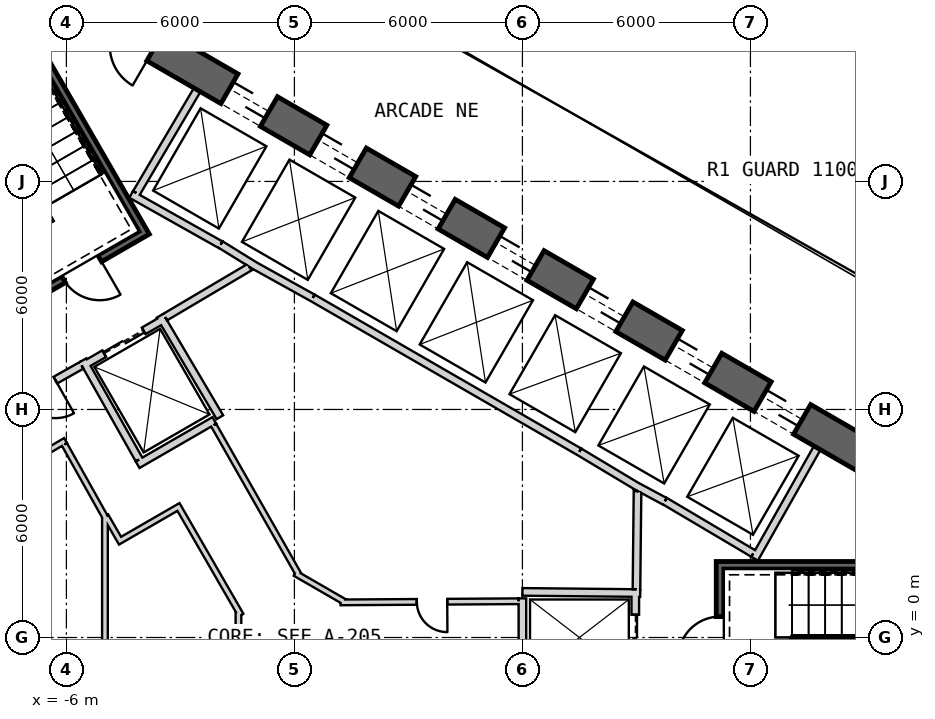
"""IFC4 building model, lengths in metres.
Left out: names, types, materials, properties, quantities, classifications, styles, units other than length and angle.
Written with IfcOpenShell. Run it as: python <this file> out.ifc"""

import sys

from ifc_helpers import new_model, si_unit, direction, frame, frame_2d, origin, place, context, subcontext, project, spatial, rectangle, extrude, element, fill, save


model = new_model("IFC4")
c1 = context("Model", 3, precision=1e-05, world=origin(), true_north=direction((0.0, 1.0)))
c2 = subcontext(c1, "Body", "Model", "MODEL_VIEW")
j1 = project(units=[si_unit("LENGTHUNIT", "METRE"), si_unit("PLANEANGLEUNIT", "RADIAN")], contexts=[c1])
p1 = place(None, origin())
s1 = spatial("IfcSite", under=j1, at=p1, CompositionType="ELEMENT")
p2 = place(p1, origin())
s2 = spatial("IfcBuilding", under=s1, at=p2, CompositionType="ELEMENT")
p3 = place(p2, frame((0.0, 0.0, 15.5)))
s3 = spatial("IfcBuildingStorey", under=s2, at=p3, CompositionType="ELEMENT", Elevation=15.5)
p4 = place(p3, frame((19.475, 2.208, 0.0), z_axis=(0.0, 0.0, 1.0), x_axis=(-0.866028369851, 0.499994862586, 0.0)))
e1 = element("IfcWall", 1, at=p4, inside=s3, PredefinedType="SHEAR", context=c2, shape_type="SweptSolid", body=[
    extrude(rectangle(XDim=31.523, YDim=0.9, at=frame_2d((15.762, 0.0))), origin(), (0.0, 0.0, 1.0), 6.0),
])
p5 = place(p4, frame((7.062, 0.0, 0.0)))
e2 = element("IfcOpeningElement", 2, at=p5, cuts=e1, PredefinedType="OPENING", context=c2, shape_type="SweptSolid", body=[
    extrude(rectangle(XDim=1.2, YDim=2.4, at=frame_2d((0.6, 1.2))), frame((0.0, 0.46, 0.0), z_axis=(0.0, -1.0, 0.0), x_axis=(1.0, 0.0, 0.0)), (0.0, 0.0, 1.0), 0.92),
])
p6 = place(p4, frame((9.762, 0.0, 0.0)))
e3 = element("IfcOpeningElement", 3, at=p6, cuts=e1, PredefinedType="OPENING", context=c2, shape_type="SweptSolid", body=[
    extrude(rectangle(XDim=1.2, YDim=2.4, at=frame_2d((0.6, 1.2))), frame((0.0, 0.46, 0.0), z_axis=(0.0, -1.0, 0.0), x_axis=(1.0, 0.0, 0.0)), (0.0, 0.0, 1.0), 0.92),
])
p7 = place(p4, frame((12.462, 0.0, 0.0)))
e4 = element("IfcOpeningElement", 4, at=p7, cuts=e1, PredefinedType="OPENING", context=c2, shape_type="SweptSolid", body=[
    extrude(rectangle(XDim=1.2, YDim=2.4, at=frame_2d((0.6, 1.2))), frame((0.0, 0.46, 0.0), z_axis=(0.0, -1.0, 0.0), x_axis=(1.0, 0.0, 0.0)), (0.0, 0.0, 1.0), 0.92),
])
p8 = place(p4, frame((15.162, 0.0, 0.0)))
e5 = element("IfcOpeningElement", 5, at=p8, cuts=e1, PredefinedType="OPENING", context=c2, shape_type="SweptSolid", body=[
    extrude(rectangle(XDim=1.2, YDim=2.4, at=frame_2d((0.6, 1.2))), frame((0.0, 0.46, 0.0), z_axis=(0.0, -1.0, 0.0), x_axis=(1.0, 0.0, 0.0)), (0.0, 0.0, 1.0), 0.92),
])
p9 = place(p4, frame((17.862, 0.0, 0.0)))
e6 = element("IfcOpeningElement", 6, at=p9, cuts=e1, PredefinedType="OPENING", context=c2, shape_type="SweptSolid", body=[
    extrude(rectangle(XDim=1.2, YDim=2.4, at=frame_2d((0.6, 1.2))), frame((0.0, 0.46, 0.0), z_axis=(0.0, -1.0, 0.0), x_axis=(1.0, 0.0, 0.0)), (0.0, 0.0, 1.0), 0.92),
])
p10 = place(p4, frame((20.562, 0.0, 0.0)))
e7 = element("IfcOpeningElement", 7, at=p10, cuts=e1, PredefinedType="OPENING", context=c2, shape_type="SweptSolid", body=[
    extrude(rectangle(XDim=1.2, YDim=2.4, at=frame_2d((0.6, 1.2))), frame((0.0, 0.46, 0.0), z_axis=(0.0, -1.0, 0.0), x_axis=(1.0, 0.0, 0.0)), (0.0, 0.0, 1.0), 0.92),
])
p11 = place(p4, frame((23.262, 0.0, 0.0)))
e8 = element("IfcOpeningElement", 8, at=p11, cuts=e1, PredefinedType="OPENING", context=c2, shape_type="SweptSolid", body=[
    extrude(rectangle(XDim=1.2, YDim=2.4, at=frame_2d((0.6, 1.2))), frame((0.0, 0.46, 0.0), z_axis=(0.0, -1.0, 0.0), x_axis=(1.0, 0.0, 0.0)), (0.0, 0.0, 1.0), 0.92),
])
p12 = place(p4, frame((3.612, 0.0, 0.0)))
e9 = element("IfcOpeningElement", 9, at=p12, cuts=e1, PredefinedType="OPENING", context=c2, shape_type="SweptSolid", body=[
    extrude(rectangle(XDim=1.2, YDim=2.4, at=frame_2d((0.6, 1.2))), frame((0.0, 0.46, 0.0), z_axis=(0.0, -1.0, 0.0), x_axis=(1.0, 0.0, 0.0)), (0.0, 0.0, 1.0), 0.92),
])
p13 = place(p4, frame((26.712, 0.0, 0.0)))
e10 = element("IfcOpeningElement", 10, at=p13, cuts=e1, PredefinedType="OPENING", context=c2, shape_type="SweptSolid", body=[
    extrude(rectangle(XDim=1.2, YDim=2.4, at=frame_2d((0.6, 1.2))), frame((0.0, 0.46, 0.0), z_axis=(0.0, -1.0, 0.0), x_axis=(1.0, 0.0, 0.0)), (0.0, 0.0, 1.0), 0.92),
])
p14 = place(p3, frame((7.497, 4.886, 0.0), z_axis=(0.0, 0.0, 1.0), x_axis=(-0.866030989016, 0.499990325971, 0.0)))
e11 = element("IfcWall", 11, at=p14, inside=s3, PredefinedType="PLUMBINGWALL", context=c2, shape_type="SweptSolid", body=[
    extrude(rectangle(XDim=8.1, YDim=0.2, at=frame_2d((4.05, 0.0))), origin(), (0.0, 0.0, 1.0), 5.7),
])
p15 = place(p3, frame((12.11, 2.073, 0.0), z_axis=(0.0, 0.0, 1.0), x_axis=(0.49196600604, 0.870614408852, 0.0)))
e12 = element("IfcWall", 12, at=p15, inside=s3, PredefinedType="PLUMBINGWALL", context=c2, shape_type="SweptSolid", body=[
    extrude(rectangle(XDim=3.35, YDim=0.2, at=frame_2d((1.675, 0.0))), origin(), (0.0, 0.0, 1.0), 5.7),
])
p16 = place(p3, frame((12.073, 2.211, 0.0), z_axis=(0.0, 0.0, 1.0), x_axis=(-0.860438357912, 0.509554542943, 0.0)))
e13 = element("IfcWall", 13, at=p16, inside=s3, PredefinedType="PLUMBINGWALL", context=c2, shape_type="SweptSolid", body=[
    extrude(rectangle(XDim=2.7, YDim=0.2, at=frame_2d((1.35, 0.0))), origin(), (0.0, 0.0, 1.0), 5.7),
])
p17 = place(p3, frame((9.748, 3.583, 0.0), z_axis=(0.0, 0.0, 1.0), x_axis=(-0.880917147855, 0.473270513147, 0.0)))
e14 = element("IfcWall", 14, at=p17, inside=s3, PredefinedType="PLUMBINGWALL", context=c2, shape_type="SweptSolid", body=[
    extrude(rectangle(XDim=0.878, YDim=0.2, at=frame_2d((0.439, 0.0))), origin(), (0.0, 0.0, 1.0), 5.7),
])
p18 = place(p3, frame((9.079, 3.937, 0.0), z_axis=(0.0, 0.0, 1.0), x_axis=(-0.857516281273, 0.51445682749, 0.0)))
e15 = element("IfcWall", 15, at=p18, inside=s3, PredefinedType="PLUMBINGWALL", context=c2, shape_type="SweptSolid", body=[
    extrude(rectangle(XDim=1.845, YDim=0.2, at=frame_2d((0.922, 0.0))), origin(), (0.0, 0.0, 1.0), 5.7),
])
p19 = place(p3, frame((-1.941, 10.339, 0.0), z_axis=(0.0, 0.0, 1.0), x_axis=(0.850216889117, -0.526432561171, 0.0)))
e16 = element("IfcWall", 16, at=p19, inside=s3, PredefinedType="PLUMBINGWALL", context=c2, shape_type="SweptSolid", body=[
    extrude(rectangle(XDim=1.078, YDim=0.2, at=frame_2d((0.539, 0.0))), origin(), (0.0, 0.0, 1.0), 5.7),
])
p20 = place(p3, frame((0.483, 8.936, 0.0), z_axis=(0.0, 0.0, 1.0), x_axis=(-0.874269620932, 0.485440655401, 0.0)))
e17 = element("IfcWall", 17, at=p20, inside=s3, PredefinedType="PLUMBINGWALL", context=c2, shape_type="SweptSolid", body=[
    extrude(rectangle(XDim=1.845, YDim=0.2, at=frame_2d((0.922, 0.0))), origin(), (0.0, 0.0, 1.0), 5.7),
])
p21 = place(p3, frame((-4.296, 11.659, 0.0), z_axis=(0.0, 0.0, 1.0), x_axis=(0.871534483978, -0.490334215854, 0.0)))
e18 = element("IfcWall", 18, at=p21, inside=s3, PredefinedType="PLUMBINGWALL", context=c2, shape_type="SweptSolid", body=[
    extrude(rectangle(XDim=2.7, YDim=0.2, at=frame_2d((1.35, 0.0))), origin(), (0.0, 0.0, 1.0), 5.7),
])
p22 = place(p3, frame((-4.158, 11.696, 0.0), z_axis=(0.0, 0.0, 1.0), x_axis=(0.508018930956, 0.861345903683, 0.0)))
e19 = element("IfcWall", 19, at=p22, inside=s3, PredefinedType="PLUMBINGWALL", context=c2, shape_type="SweptSolid", body=[
    extrude(rectangle(XDim=3.15, YDim=0.2, at=frame_2d((1.575, 0.0))), origin(), (0.0, 0.0, 1.0), 5.7),
])
p23 = place(p3, frame((19.2, 1.9, -0.3), z_axis=(0.0, 0.0, 1.0), x_axis=(-1.0, 0.0, 0.0)))
e20 = element("IfcWall", 20, at=p23, inside=s3, PredefinedType="SHEAR", context=c2, shape_type="SweptSolid", body=[
    extrude(rectangle(XDim=8.1, YDim=0.2, at=frame_2d((4.05, 0.0))), origin(), (0.0, 0.0, 1.0), 6.0),
])
p24 = place(p3, frame((11.2, -1.8, -0.3), z_axis=(0.0, 0.0, 1.0), x_axis=(0.0, 1.0, 0.0)))
e21 = element("IfcWall", 21, at=p24, inside=s3, PredefinedType="SHEAR", context=c2, shape_type="SweptSolid", body=[
    extrude(rectangle(XDim=3.6, YDim=0.2, at=frame_2d((1.8, 0.0))), origin(), (0.0, 0.0, 1.0), 6.0),
])
p25 = place(p24, frame((1.25, 0.0, 0.3)))
e22 = element("IfcOpeningElement", 22, at=p25, cuts=e21, PredefinedType="OPENING", context=c2, shape_type="SweptSolid", body=[
    extrude(rectangle(XDim=1.1, YDim=2.1, at=frame_2d((0.55, 1.05))), frame((0.0, 0.11, 0.0), z_axis=(0.0, -1.0, 0.0), x_axis=(1.0, 0.0, 0.0)), (0.0, 0.0, 1.0), 0.22),
])
p26 = place(p3, frame((8.97, 1.2, 0.0), z_axis=(0.0, 0.0, 1.0), x_axis=(0.0, -1.0, 0.0)))
e23 = element("IfcWall", 23, at=p26, inside=s3, PredefinedType="PLUMBINGWALL", context=c2, shape_type="SweptSolid", body=[
    extrude(rectangle(XDim=2.4, YDim=0.2, at=frame_2d((1.2, 0.0))), origin(), (0.0, 0.0, 1.0), 5.7),
])
p27 = place(p26, frame((0.6, 0.0, 0.0)))
e24 = element("IfcOpeningElement", 24, at=p27, cuts=e23, PredefinedType="OPENING", context=c2, shape_type="SweptSolid", body=[
    extrude(rectangle(XDim=1.2, YDim=2.4, at=frame_2d((0.6, 1.2))), frame((0.0, 0.11, 0.0), z_axis=(0.0, -1.0, 0.0), x_axis=(1.0, 0.0, 0.0)), (0.0, 0.0, 1.0), 0.22),
])
p28 = place(p3, frame((6.0, 1.2, 0.0), z_axis=(0.0, 0.0, 1.0), x_axis=(0.999949988, -0.010001074852, 0.0)))
e25 = element("IfcWall", 25, at=p28, inside=s3, PredefinedType="PLUMBINGWALL", context=c2, shape_type="SweptSolid", body=[
    extrude(rectangle(XDim=3.1, YDim=0.2, at=frame_2d((1.55, 0.0))), origin(), (0.0, 0.0, 1.0), 5.7),
])
p29 = place(p3, frame((6.0, -1.1, 0.0), z_axis=(0.0, 0.0, 1.0), x_axis=(0.0, 1.0, 0.0)))
e26 = element("IfcWall", 26, at=p29, inside=s3, PredefinedType="PLUMBINGWALL", context=c2, shape_type="SweptSolid", body=[
    extrude(rectangle(XDim=2.13, YDim=0.2, at=frame_2d((1.065, 0.0))), origin(), (0.0, 0.0, 1.0), 5.7),
])
p30 = place(p3, frame((-7.854, 17.405, -0.3), z_axis=(0.0, 0.0, 1.0), x_axis=(0.499997992926, -0.866026562566, 0.0)))
e27 = element("IfcWall", 27, at=p30, inside=s3, PredefinedType="SHEAR", context=c2, shape_type="SweptSolid", body=[
    extrude(rectangle(XDim=7.9, YDim=0.2, at=frame_2d((3.95, 0.0))), origin(), (0.0, 0.0, 1.0), 6.0),
])
p31 = place(p3, frame((-7.159, 8.8, -0.3), z_axis=(0.0, 0.0, 1.0), x_axis=(0.866047807691, 0.499961193289, 0.0)))
e28 = element("IfcWall", 28, at=p31, inside=s3, PredefinedType="SHEAR", context=c2, shape_type="SweptSolid", body=[
    extrude(rectangle(XDim=3.6, YDim=0.2, at=frame_2d((1.8, 0.0))), origin(), (0.0, 0.0, 1.0), 6.0),
])
p32 = place(p31, frame((1.25, 0.0, 0.3)))
e29 = element("IfcOpeningElement", 29, at=p32, cuts=e28, PredefinedType="OPENING", context=c2, shape_type="SweptSolid", body=[
    extrude(rectangle(XDim=1.1, YDim=2.1, at=frame_2d((0.55, 1.05))), frame((0.0, 0.11, 0.0), z_axis=(0.0, -1.0, 0.0), x_axis=(1.0, 0.0, 0.0)), (0.0, 0.0, 1.0), 0.22),
])
p33 = place(p3, frame((-5.524, 7.168, 0.0), z_axis=(0.0, 0.0, 1.0), x_axis=(0.866024647952, 0.500001309137, 0.0)))
e30 = element("IfcWall", 30, at=p33, inside=s3, PredefinedType="PLUMBINGWALL", context=c2, shape_type="SweptSolid", body=[
    extrude(rectangle(XDim=2.4, YDim=0.2, at=frame_2d((1.2, 0.0))), origin(), (0.0, 0.0, 1.0), 5.7),
])
p34 = place(p33, frame((0.6, 0.0, 0.0)))
e31 = element("IfcOpeningElement", 31, at=p34, cuts=e30, PredefinedType="OPENING", context=c2, shape_type="SweptSolid", body=[
    extrude(rectangle(XDim=1.2, YDim=2.4, at=frame_2d((0.6, 1.2))), frame((0.0, 0.11, 0.0), z_axis=(0.0, -1.0, 0.0), x_axis=(1.0, 0.0, 0.0)), (0.0, 0.0, 1.0), 0.22),
])
p35 = place(p3, frame((-3.538, 8.465, 0.0), z_axis=(0.0, 0.0, 1.0), x_axis=(0.508647062354, -0.860975125052, 0.0)))
e32 = element("IfcWall", 32, at=p35, inside=s3, PredefinedType="PLUMBINGWALL", context=c2, shape_type="SweptSolid", body=[
    extrude(rectangle(XDim=3.1, YDim=0.2, at=frame_2d((1.55, 0.0))), origin(), (0.0, 0.0, 1.0), 5.7),
])
p36 = place(p3, frame((-2.108, 5.711, 0.0), z_axis=(0.0, 0.0, 1.0), x_axis=(-0.866009305107, -0.50002788269, 0.0)))
e33 = element("IfcWall", 33, at=p36, inside=s3, PredefinedType="PLUMBINGWALL", context=c2, shape_type="SweptSolid", body=[
    extrude(rectangle(XDim=2.329, YDim=0.2, at=frame_2d((1.165, 0.0))), origin(), (0.0, 0.0, 1.0), 5.7),
])
p37 = place(p3, frame((-5.562, 7.296, 0.0), z_axis=(0.0, 0.0, 1.0), x_axis=(0.49134651263, -0.870964180966, 0.0)))
e34 = element("IfcWall", 34, at=p37, inside=s3, PredefinedType="PLUMBINGWALL", context=c2, shape_type="SweptSolid", body=[
    extrude(rectangle(XDim=3.0, YDim=0.2, at=frame_2d((1.5, 0.0))), origin(), (0.0, 0.0, 1.0), 5.7),
])
p38 = place(p3, frame((9.001, 1.27, 0.0), z_axis=(0.0, 0.0, 1.0), x_axis=(0.010784614026, 0.999941844359, 0.0)))
e35 = element("IfcWall", 35, at=p38, inside=s3, PredefinedType="PARTITIONING", context=c2, shape_type="SweptSolid", body=[
    extrude(rectangle(XDim=2.581, YDim=0.2, at=frame_2d((1.291, 0.0))), origin(), (0.0, 0.0, 1.0), 5.7),
])
p39 = place(p3, frame((-1.18, 9.744, 0.0), z_axis=(0.0, 0.0, 1.0), x_axis=(-0.860615607571, -0.509255118781, 0.0)))
e36 = element("IfcWall", 36, at=p39, inside=s3, PredefinedType="PARTITIONING", context=c2, shape_type="SweptSolid", body=[
    extrude(rectangle(XDim=2.581, YDim=0.2, at=frame_2d((1.29, 0.0))), origin(), (0.0, 0.0, 1.0), 5.7),
])
p40 = place(p3, frame((-5.6, 7.16, 0.0), z_axis=(0.0, 0.0, 1.0), x_axis=(-0.871363259478, -0.490638431059, 0.0)))
e37 = element("IfcWall", 37, at=p40, inside=s3, PredefinedType="PARTITIONING", context=c2, shape_type="SweptSolid", body=[
    extrude(rectangle(XDim=2.581, YDim=0.2, at=frame_2d((1.291, 0.0))), origin(), (0.0, 0.0, 1.0), 5.7),
])
p41 = place(p40, frame((0.791, 0.0, 0.0)))
e38 = element("IfcOpeningElement", 38, at=p41, cuts=e37, PredefinedType="OPENING", context=c2, shape_type="SweptSolid", body=[
    extrude(rectangle(XDim=1.0, YDim=2.1, at=frame_2d((0.5, 1.05))), frame((0.0, 0.11, 0.0), z_axis=(0.0, -1.0, 0.0), x_axis=(1.0, 0.0, 0.0)), (0.0, 0.0, 1.0), 0.22),
])
p42 = place(p3, frame((1.214, 0.924, 0.0), z_axis=(0.0, 0.0, 1.0), x_axis=(0.999979796062, 0.006356686907, 0.0)))
e39 = element("IfcWall", 39, at=p42, inside=s3, PredefinedType="PLUMBINGWALL", context=c2, shape_type="SweptSolid", body=[
    extrude(rectangle(XDim=4.686, YDim=0.15, at=frame_2d((2.343, 0.0))), origin(), (0.0, 0.0, 1.0), 5.7),
])
p43 = place(p42, frame((2.007, 0.0, 0.0)))
e40 = element("IfcOpeningElement", 40, at=p43, cuts=e39, PredefinedType="OPENING", context=c2, shape_type="SweptSolid", body=[
    extrude(rectangle(XDim=0.8, YDim=2.1, at=frame_2d((0.4, 1.05))), frame((0.0, 0.085, 0.0), z_axis=(0.0, -1.0, 0.0), x_axis=(1.0, 0.0, 0.0)), (0.0, 0.0, 1.0), 0.17),
])
p44 = place(p3, frame((0.019, 1.689, 0.0), z_axis=(0.0, 0.0, 1.0), x_axis=(0.866047774678, -0.499961250474, 0.0)))
e41 = element("IfcWall", 41, at=p44, inside=s3, PredefinedType="PLUMBINGWALL", context=c2, shape_type="SweptSolid", body=[
    extrude(rectangle(XDim=1.504, YDim=0.15, at=frame_2d((0.752, 0.0))), origin(), (0.0, 0.0, 1.0), 5.7),
])
p45 = place(p3, frame((-2.124, 5.586, 0.0), z_axis=(0.0, 0.0, 1.0), x_axis=(0.494514430604, -0.869169418424, 0.0)))
e42 = element("IfcWall", 42, at=p45, inside=s3, PredefinedType="PLUMBINGWALL", context=c2, shape_type="SweptSolid", body=[
    extrude(rectangle(XDim=4.534, YDim=0.15, at=frame_2d((2.267, 0.0))), origin(), (0.0, 0.0, 1.0), 5.7),
])
p46 = place(p3, frame((-4.985, -3.235, 0.0), z_axis=(0.0, 0.0, 1.0), x_axis=(0.0, 1.0, 0.0)))
e43 = element("IfcWall", 43, at=p46, inside=s3, PredefinedType="PLUMBINGWALL", context=c2, shape_type="SweptSolid", body=[
    extrude(rectangle(XDim=6.469, YDim=0.15, at=frame_2d((3.235, 0.0))), origin(), (0.0, 0.0, 1.0), 5.7),
])
p47 = place(p3, frame((-6.024, 5.183, 0.0), z_axis=(0.0, 0.0, 1.0), x_axis=(-0.860126804455, -0.510080268447, 0.0)))
e44 = element("IfcWall", 44, at=p47, inside=s3, PredefinedType="PLUMBINGWALL", context=c2, shape_type="SweptSolid", body=[
    extrude(rectangle(XDim=2.24, YDim=0.15, at=frame_2d((1.12, 0.0))), origin(), (0.0, 0.0, 1.0), 5.7),
])
p48 = place(p3, frame((-4.983, 3.172, 0.0), z_axis=(0.0, 0.0, 1.0), x_axis=(-0.488701962514, 0.872450796226, 0.0)))
e45 = element("IfcWall", 45, at=p48, inside=s3, PredefinedType="PLUMBINGWALL", context=c2, shape_type="SweptSolid", body=[
    extrude(rectangle(XDim=2.187, YDim=0.15, at=frame_2d((1.093, 0.0))), origin(), (0.0, 0.0, 1.0), 5.7),
])
p49 = place(p3, frame((-4.551, 2.482, 0.0), z_axis=(0.0, 0.0, 1.0), x_axis=(-0.499852395195, 0.866110606688, 0.0)))
e46 = element("IfcWall", 46, at=p49, inside=s3, PredefinedType="PLUMBINGWALL", context=c2, shape_type="SweptSolid", body=[
    extrude(rectangle(XDim=0.813, YDim=0.15, at=frame_2d((0.407, 0.0))), origin(), (0.0, 0.0, 1.0), 5.7),
])
p50 = place(p3, frame((-2.986, 3.472, 0.0), z_axis=(0.0, 0.0, 1.0), x_axis=(-0.866059624469, -0.499940723351, 0.0)))
e47 = element("IfcWall", 47, at=p50, inside=s3, PredefinedType="PLUMBINGWALL", context=c2, shape_type="SweptSolid", body=[
    extrude(rectangle(XDim=1.775, YDim=0.15, at=frame_2d((0.888, 0.0))), origin(), (0.0, 0.0, 1.0), 5.7),
])
p51 = place(p3, frame((-1.407, 0.587, 0.0), z_axis=(0.0, 0.0, 1.0), x_axis=(-0.500029427677, 0.866008413041, 0.0)))
e48 = element("IfcWall", 48, at=p51, inside=s3, PredefinedType="PLUMBINGWALL", context=c2, shape_type="SweptSolid", body=[
    extrude(rectangle(XDim=3.213, YDim=0.15, at=frame_2d((1.606, 0.0))), origin(), (0.0, 0.0, 1.0), 5.7),
])
p52 = place(p3, frame((-1.472, -0.83, 0.0), z_axis=(0.0, 0.0, 1.0), x_axis=(0.0, 1.0, 0.0)))
e49 = element("IfcWall", 49, at=p52, inside=s3, PredefinedType="PLUMBINGWALL", context=c2, shape_type="SweptSolid", body=[
    extrude(rectangle(XDim=1.507, YDim=0.15, at=frame_2d((0.753, 0.0))), origin(), (0.0, 0.0, 1.0), 5.7),
])
p53 = place(p25, origin())
e50 = element("IfcDoor", 50, at=p53, inside=s3, OperationType="SINGLE_SWING_LEFT", PredefinedType="USERDEFINED", context=c2, shape_type="SweptSolid", body=[
    extrude(rectangle(XDim=1.1, YDim=2.1, at=frame_2d((0.55, 1.05))), frame((0.0, 0.025, 0.0), z_axis=(0.0, -1.0, 0.0), x_axis=(1.0, 0.0, 0.0)), (0.0, 0.0, 1.0), 0.05),
])
fill(e22, e50)
p54 = place(p27, origin())
e51 = element("IfcDoor", 51, at=p54, inside=s3, OperationType="SLIDING_TO_LEFT", PredefinedType="USERDEFINED", context=c2, shape_type="SweptSolid", body=[
    extrude(rectangle(XDim=1.2, YDim=2.4, at=frame_2d((0.6, 1.2))), frame((0.0, 0.025, 0.0), z_axis=(0.0, -1.0, 0.0), x_axis=(1.0, 0.0, 0.0)), (0.0, 0.0, 1.0), 0.05),
])
fill(e24, e51)
p55 = place(p32, origin())
e52 = element("IfcDoor", 52, at=p55, inside=s3, OperationType="SINGLE_SWING_RIGHT", PredefinedType="USERDEFINED", context=c2, shape_type="SweptSolid", body=[
    extrude(rectangle(XDim=1.1, YDim=2.1, at=frame_2d((0.55, 1.05))), frame((0.0, 0.025, 0.0), z_axis=(0.0, -1.0, 0.0), x_axis=(1.0, 0.0, 0.0)), (0.0, 0.0, 1.0), 0.05),
])
fill(e29, e52)
p56 = place(p41, origin())
e53 = element("IfcDoor", 53, at=p56, inside=s3, OperationType="SINGLE_SWING_LEFT", PredefinedType="USERDEFINED", context=c2, shape_type="SweptSolid", body=[
    extrude(rectangle(XDim=1.0, YDim=2.1, at=frame_2d((0.5, 1.05))), frame((0.0, 0.025, 0.0), z_axis=(0.0, -1.0, 0.0), x_axis=(1.0, 0.0, 0.0)), (0.0, 0.0, 1.0), 0.05),
])
fill(e38, e53)
p57 = place(p34, origin())
e54 = element("IfcDoor", 54, at=p57, inside=s3, OperationType="SLIDING_TO_LEFT", PredefinedType="USERDEFINED", context=c2, shape_type="SweptSolid", body=[
    extrude(rectangle(XDim=1.2, YDim=2.4, at=frame_2d((0.6, 1.2))), frame((0.0, 0.025, 0.0), z_axis=(0.0, -1.0, 0.0), x_axis=(1.0, 0.0, 0.0)), (0.0, 0.0, 1.0), 0.05),
])
fill(e31, e54)
p58 = place(p43, origin())
e55 = element("IfcDoor", 55, at=p58, inside=s3, OperationType="SINGLE_SWING_RIGHT", PredefinedType="USERDEFINED", context=c2, shape_type="SweptSolid", body=[
    extrude(rectangle(XDim=0.8, YDim=2.1, at=frame_2d((0.4, 1.05))), frame((0.0, 0.025, 0.0), z_axis=(0.0, -1.0, 0.0), x_axis=(1.0, 0.0, 0.0)), (0.0, 0.0, 1.0), 0.05),
])
fill(e40, e55)
p59 = place(p5, origin())
e56 = element("IfcDoor", 56, at=p59, inside=s3, OperationType="SLIDING_TO_LEFT", PredefinedType="USERDEFINED", context=c2, shape_type="SweptSolid", body=[
    extrude(rectangle(XDim=1.2, YDim=2.4, at=frame_2d((0.6, 1.2))), frame((0.0, 0.025, 0.0), z_axis=(0.0, -1.0, 0.0), x_axis=(1.0, 0.0, 0.0)), (0.0, 0.0, 1.0), 0.05),
])
fill(e2, e56)
p60 = place(p6, origin())
e57 = element("IfcDoor", 57, at=p60, inside=s3, OperationType="SLIDING_TO_LEFT", PredefinedType="USERDEFINED", context=c2, shape_type="SweptSolid", body=[
    extrude(rectangle(XDim=1.2, YDim=2.4, at=frame_2d((0.6, 1.2))), frame((0.0, 0.025, 0.0), z_axis=(0.0, -1.0, 0.0), x_axis=(1.0, 0.0, 0.0)), (0.0, 0.0, 1.0), 0.05),
])
fill(e3, e57)
p61 = place(p7, origin())
e58 = element("IfcDoor", 58, at=p61, inside=s3, OperationType="SLIDING_TO_LEFT", PredefinedType="USERDEFINED", context=c2, shape_type="SweptSolid", body=[
    extrude(rectangle(XDim=1.2, YDim=2.4, at=frame_2d((0.6, 1.2))), frame((0.0, 0.025, 0.0), z_axis=(0.0, -1.0, 0.0), x_axis=(1.0, 0.0, 0.0)), (0.0, 0.0, 1.0), 0.05),
])
fill(e4, e58)
p62 = place(p8, origin())
e59 = element("IfcDoor", 59, at=p62, inside=s3, OperationType="SLIDING_TO_LEFT", PredefinedType="USERDEFINED", context=c2, shape_type="SweptSolid", body=[
    extrude(rectangle(XDim=1.2, YDim=2.4, at=frame_2d((0.6, 1.2))), frame((0.0, 0.025, 0.0), z_axis=(0.0, -1.0, 0.0), x_axis=(1.0, 0.0, 0.0)), (0.0, 0.0, 1.0), 0.05),
])
fill(e5, e59)
p63 = place(p9, origin())
e60 = element("IfcDoor", 60, at=p63, inside=s3, OperationType="SLIDING_TO_LEFT", PredefinedType="USERDEFINED", context=c2, shape_type="SweptSolid", body=[
    extrude(rectangle(XDim=1.2, YDim=2.4, at=frame_2d((0.6, 1.2))), frame((0.0, 0.025, 0.0), z_axis=(0.0, -1.0, 0.0), x_axis=(1.0, 0.0, 0.0)), (0.0, 0.0, 1.0), 0.05),
])
fill(e6, e60)
p64 = place(p10, origin())
e61 = element("IfcDoor", 61, at=p64, inside=s3, OperationType="SLIDING_TO_LEFT", PredefinedType="USERDEFINED", context=c2, shape_type="SweptSolid", body=[
    extrude(rectangle(XDim=1.2, YDim=2.4, at=frame_2d((0.6, 1.2))), frame((0.0, 0.025, 0.0), z_axis=(0.0, -1.0, 0.0), x_axis=(1.0, 0.0, 0.0)), (0.0, 0.0, 1.0), 0.05),
])
fill(e7, e61)
p65 = place(p11, origin())
e62 = element("IfcDoor", 62, at=p65, inside=s3, OperationType="SLIDING_TO_LEFT", PredefinedType="USERDEFINED", context=c2, shape_type="SweptSolid", body=[
    extrude(rectangle(XDim=1.2, YDim=2.4, at=frame_2d((0.6, 1.2))), frame((0.0, 0.025, 0.0), z_axis=(0.0, -1.0, 0.0), x_axis=(1.0, 0.0, 0.0)), (0.0, 0.0, 1.0), 0.05),
])
fill(e8, e62)
save(model, sys.argv[1])
